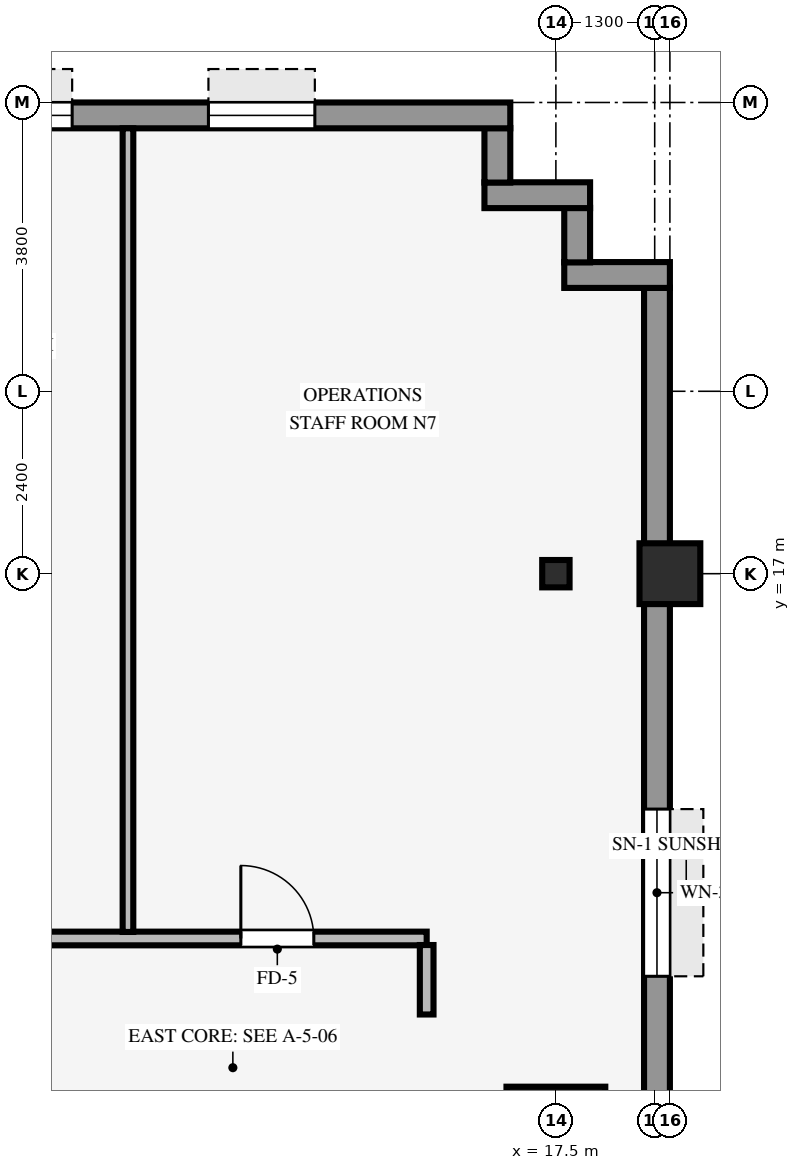
"""IFC4 building model, lengths in metres.
Left out: names, types, materials, properties, quantities, classifications, styles, units other than length and angle.
Written with IfcOpenShell. Run it as: python <this file> out.ifc"""

import sys

from ifc_helpers import new_model, si_unit, direction, frame, frame_2d, origin, origin_2d, place, context, subcontext, project, spatial, rectangle, hollow_rectangle, i_section, extrude, source, transform, mapped, element, fill, save


model = new_model("IFC4")
c1 = context("Model", 3, precision=1e-05, world=origin(), true_north=direction((0.0, 1.0)))
c2 = subcontext(c1, "Body", "Model", "MODEL_VIEW")
j1 = project(units=[si_unit("LENGTHUNIT", "METRE"), si_unit("PLANEANGLEUNIT", "RADIAN")], contexts=[c1])
p1 = place(None, origin())
s1 = spatial("IfcSite", under=j1, at=p1, CompositionType="ELEMENT")
p2 = place(p1, origin())
s2 = spatial("IfcBuilding", under=s1, at=p2, CompositionType="ELEMENT")
p3 = place(p2, frame((0.0, 0.0, 53.15)))
s3 = spatial("IfcBuildingStorey", under=s2, at=p3, CompositionType="ELEMENT", Elevation=53.15)
p4 = place(p3, frame((17.5, 9.6, 0.0), z_axis=(0.0, 0.0, 1.0), x_axis=(1.0, 0.0, 0.0)))
e1 = element("IfcColumn", 1, at=p4, inside=s3, PredefinedType="COLUMN", context=c2, shape_type="SweptSolid", body=[
    extrude(rectangle(XDim=1.3, YDim=1.3, at=origin_2d()), origin(), (0.0, 0.0, 1.0), 3.25),
])
p5 = place(p3, frame((19.0, 17.0, 0.0), z_axis=(0.0, 0.0, 1.0), x_axis=(1.0, 0.0, 0.0)))
e2 = element("IfcColumn", 2, at=p5, inside=s3, PredefinedType="COLUMN", context=c2, shape_type="SweptSolid", body=[
    extrude(hollow_rectangle(XDim=0.8, YDim=0.8, WallThickness=0.055, InnerFilletRadius=0.055, OuterFilletRadius=0.11, at=origin_2d()), origin(), (0.0, 0.0, 1.0), 3.25),
])
p6 = place(p3, frame((17.5, 17.0, 0.0), z_axis=(0.0, 0.0, 1.0), x_axis=(1.0, 0.0, 0.0)))
e3 = element("IfcColumn", 3, at=p6, inside=s3, PredefinedType="COLUMN", context=c2, shape_type="SweptSolid", body=[
    extrude(i_section(OverallWidth=0.36, OverallDepth=0.36, WebThickness=0.021, FlangeThickness=0.021, FilletRadius=0.018, at=origin_2d()), origin(), (0.0, 0.0, 1.0), 3.25),
])
p7 = place(p3, frame((18.83, -20.764, 0.0), z_axis=(0.0, 0.0, 1.0), x_axis=(0.0, 1.0, 0.0)))
e4 = element("IfcWall", 4, at=p7, inside=s3, PredefinedType="STANDARD", context=c2, shape_type="SweptSolid", body=[
    extrude(rectangle(XDim=41.528, YDim=0.34, at=frame_2d((20.764, 0.0))), origin(), (0.0, 0.0, 1.0), 3.24),
])
p8 = place(p7, frame((6.862, 0.0, 0.8)))
e5 = element("IfcOpeningElement", 5, at=p8, cuts=e4, PredefinedType="OPENING", context=c2, shape_type="SweptSolid", body=[
    extrude(rectangle(XDim=2.2, YDim=1.65, at=frame_2d((1.1, 0.825))), frame((0.0, 0.18, 0.0), z_axis=(0.0, -1.0, 0.0), x_axis=(1.0, 0.0, 0.0)), (0.0, 0.0, 1.0), 0.36),
])
p9 = place(p7, frame((32.467, 0.0, 0.8)))
e6 = element("IfcOpeningElement", 6, at=p9, cuts=e4, PredefinedType="OPENING", context=c2, shape_type="SweptSolid", body=[
    extrude(rectangle(XDim=2.2, YDim=1.65, at=frame_2d((1.1, 0.825))), frame((0.0, 0.18, 0.0), z_axis=(0.0, -1.0, 0.0), x_axis=(1.0, 0.0, 0.0)), (0.0, 0.0, 1.0), 0.36),
])
p10 = place(p3, frame((17.61, 20.93, 0.0), z_axis=(0.0, 0.0, 1.0), x_axis=(1.0, 0.0, 0.0)))
e7 = element("IfcWall", 7, at=p10, inside=s3, PredefinedType="STANDARD", context=c2, shape_type="SweptSolid", body=[
    extrude(rectangle(XDim=1.39, YDim=0.34, at=frame_2d((0.695, 0.0))), origin(), (0.0, 0.0, 1.0), 3.24),
])
p11 = place(p3, frame((17.78, 21.096, 0.0), z_axis=(0.0, 0.0, 1.0), x_axis=(0.0, 1.0, 0.0)))
e8 = element("IfcWall", 8, at=p11, inside=s3, PredefinedType="STANDARD", context=c2, shape_type="SweptSolid", body=[
    extrude(rectangle(XDim=0.718, YDim=0.34, at=frame_2d((0.359, 0.0))), origin(), (0.0, 0.0, 1.0), 3.24),
])
p12 = place(p3, frame((16.56, 21.98, 0.0), z_axis=(0.0, 0.0, 1.0), x_axis=(1.0, 0.0, 0.0)))
e9 = element("IfcWall", 9, at=p12, inside=s3, PredefinedType="STANDARD", context=c2, shape_type="SweptSolid", body=[
    extrude(rectangle(XDim=1.39, YDim=0.34, at=frame_2d((0.695, 0.0))), origin(), (0.0, 0.0, 1.0), 3.24),
])
p13 = place(p3, frame((16.73, 22.146, 0.0), z_axis=(0.0, 0.0, 1.0), x_axis=(0.0, 1.0, 0.0)))
e10 = element("IfcWall", 10, at=p13, inside=s3, PredefinedType="STANDARD", context=c2, shape_type="SweptSolid", body=[
    extrude(rectangle(XDim=0.718, YDim=0.34, at=frame_2d((0.359, 0.0))), origin(), (0.0, 0.0, 1.0), 3.24),
])
p14 = place(p3, frame((-16.9, 23.03, 0.0), z_axis=(0.0, 0.0, 1.0), x_axis=(1.0, 0.0, 0.0)))
e11 = element("IfcWall", 11, at=p14, inside=s3, PredefinedType="STANDARD", context=c2, shape_type="SweptSolid", body=[
    extrude(rectangle(XDim=33.8, YDim=0.34, at=frame_2d((16.9, 0.0))), origin(), (0.0, 0.0, 1.0), 2.585),
])
p15 = place(p14, frame((2.121, 0.0, 0.8)))
e12 = element("IfcOpeningElement", 12, at=p15, cuts=e11, PredefinedType="OPENING", context=c2, shape_type="SweptSolid", body=[
    extrude(rectangle(XDim=1.4, YDim=1.65, at=frame_2d((0.7, 0.825))), frame((0.0, 0.18, 0.0), z_axis=(0.0, -1.0, 0.0), x_axis=(1.0, 0.0, 0.0)), (0.0, 0.0, 1.0), 0.36),
])
p16 = place(p14, frame((5.764, 0.0, 0.8)))
e13 = element("IfcOpeningElement", 13, at=p16, cuts=e11, PredefinedType="OPENING", context=c2, shape_type="SweptSolid", body=[
    extrude(rectangle(XDim=1.4, YDim=1.65, at=frame_2d((0.7, 0.825))), frame((0.0, 0.18, 0.0), z_axis=(0.0, -1.0, 0.0), x_axis=(1.0, 0.0, 0.0)), (0.0, 0.0, 1.0), 0.36),
])
p17 = place(p14, frame((11.657, 0.0, 0.8)))
e14 = element("IfcOpeningElement", 14, at=p17, cuts=e11, PredefinedType="OPENING", context=c2, shape_type="SweptSolid", body=[
    extrude(rectangle(XDim=1.4, YDim=1.65, at=frame_2d((0.7, 0.825))), frame((0.0, 0.18, 0.0), z_axis=(0.0, -1.0, 0.0), x_axis=(1.0, 0.0, 0.0)), (0.0, 0.0, 1.0), 0.36),
])
p18 = place(p14, frame((21.193, 0.0, 0.8)))
e15 = element("IfcOpeningElement", 15, at=p18, cuts=e11, PredefinedType="OPENING", context=c2, shape_type="SweptSolid", body=[
    extrude(rectangle(XDim=1.4, YDim=1.65, at=frame_2d((0.7, 0.825))), frame((0.0, 0.18, 0.0), z_axis=(0.0, -1.0, 0.0), x_axis=(1.0, 0.0, 0.0)), (0.0, 0.0, 1.0), 0.36),
])
p19 = place(p14, frame((26.636, 0.0, 0.8)))
e16 = element("IfcOpeningElement", 16, at=p19, cuts=e11, PredefinedType="OPENING", context=c2, shape_type="SweptSolid", body=[
    extrude(rectangle(XDim=1.4, YDim=1.65, at=frame_2d((0.7, 0.825))), frame((0.0, 0.18, 0.0), z_axis=(0.0, -1.0, 0.0), x_axis=(1.0, 0.0, 0.0)), (0.0, 0.0, 1.0), 0.36),
])
p20 = place(p14, frame((29.829, 0.0, 0.8)))
e17 = element("IfcOpeningElement", 17, at=p20, cuts=e11, PredefinedType="OPENING", context=c2, shape_type="SweptSolid", body=[
    extrude(rectangle(XDim=1.4, YDim=1.65, at=frame_2d((0.7, 0.825))), frame((0.0, 0.18, 0.0), z_axis=(0.0, -1.0, 0.0), x_axis=(1.0, 0.0, 0.0)), (0.0, 0.0, 1.0), 0.36),
])
p21 = place(p3, frame((-15.8, 12.2, 0.0), z_axis=(0.0, 0.0, 1.0), x_axis=(1.0, 0.0, 0.0)))
e18 = element("IfcWall", 18, at=p21, inside=s3, PredefinedType="PARTITIONING", context=c2, shape_type="SweptSolid", body=[
    extrude(rectangle(XDim=31.6, YDim=0.18, at=frame_2d((15.8, 0.0))), origin(), (0.0, 0.0, 1.0), 3.24),
])
p22 = place(p21, frame((5.605, 0.0, 0.0)))
e19 = element("IfcOpeningElement", 19, at=p22, cuts=e18, PredefinedType="OPENING", context=c2, shape_type="SweptSolid", body=[
    extrude(rectangle(XDim=0.96, YDim=2.1, at=frame_2d((0.48, 1.05))), frame((0.0, 0.1, 0.0), z_axis=(0.0, -1.0, 0.0), x_axis=(1.0, 0.0, 0.0)), (0.0, 0.0, 1.0), 0.2),
])
p23 = place(p21, frame((16.895, 0.0, 0.0)))
e20 = element("IfcOpeningElement", 20, at=p23, cuts=e18, PredefinedType="OPENING", context=c2, shape_type="SweptSolid", body=[
    extrude(rectangle(XDim=0.96, YDim=2.1, at=frame_2d((0.48, 1.05))), frame((0.0, 0.1, 0.0), z_axis=(0.0, -1.0, 0.0), x_axis=(1.0, 0.0, 0.0)), (0.0, 0.0, 1.0), 0.2),
])
p24 = place(p21, frame((21.25, 0.0, 0.0)))
e21 = element("IfcOpeningElement", 21, at=p24, cuts=e18, PredefinedType="OPENING", context=c2, shape_type="SweptSolid", body=[
    extrude(rectangle(XDim=0.96, YDim=2.1, at=frame_2d((0.48, 1.05))), frame((0.0, 0.1, 0.0), z_axis=(0.0, -1.0, 0.0), x_axis=(1.0, 0.0, 0.0)), (0.0, 0.0, 1.0), 0.2),
])
p25 = place(p21, frame((25.21, 0.0, 0.0)))
e22 = element("IfcOpeningElement", 22, at=p25, cuts=e18, PredefinedType="OPENING", context=c2, shape_type="SweptSolid", body=[
    extrude(rectangle(XDim=0.96, YDim=2.1, at=frame_2d((0.48, 1.05))), frame((0.0, 0.1, 0.0), z_axis=(0.0, -1.0, 0.0), x_axis=(1.0, 0.0, 0.0)), (0.0, 0.0, 1.0), 0.2),
])
p26 = place(p21, frame((29.155, 0.0, 0.0)))
e23 = element("IfcOpeningElement", 23, at=p26, cuts=e18, PredefinedType="OPENING", context=c2, shape_type="SweptSolid", body=[
    extrude(rectangle(XDim=0.96, YDim=2.1, at=frame_2d((0.48, 1.05))), frame((0.0, 0.1, 0.0), z_axis=(0.0, -1.0, 0.0), x_axis=(1.0, 0.0, 0.0)), (0.0, 0.0, 1.0), 0.2),
])
p27 = place(p21, frame((10.5, 0.0, 0.0)))
e24 = element("IfcOpeningElement", 24, at=p27, cuts=e18, PredefinedType="OPENING", context=c2, shape_type="SweptSolid", body=[
    extrude(rectangle(XDim=0.96, YDim=2.1, at=frame_2d((0.48, 1.05))), frame((0.0, 0.1, 0.0), z_axis=(0.0, -1.0, 0.0), x_axis=(1.0, 0.0, 0.0)), (0.0, 0.0, 1.0), 0.2),
])
p28 = place(p21, frame((0.925, 0.0, 0.0)))
e25 = element("IfcOpeningElement", 25, at=p28, cuts=e18, PredefinedType="OPENING", context=c2, shape_type="SweptSolid", body=[
    extrude(rectangle(XDim=0.96, YDim=2.1, at=frame_2d((0.48, 1.05))), frame((0.0, 0.1, 0.0), z_axis=(0.0, -1.0, 0.0), x_axis=(1.0, 0.0, 0.0)), (0.0, 0.0, 1.0), 0.2),
])
p29 = place(p3, frame((11.87, 12.286, 0.0), z_axis=(0.0, 0.0, 1.0), x_axis=(0.0, 1.0, 0.0)))
e26 = element("IfcWall", 26, at=p29, inside=s3, PredefinedType="PARTITIONING", context=c2, shape_type="SweptSolid", body=[
    extrude(rectangle(XDim=10.574, YDim=0.14, at=frame_2d((5.287, 0.0))), origin(), (0.0, 0.0, 1.0), 3.24),
])
p30 = place(p3, frame((15.8, 11.2, 0.0), z_axis=(0.0, 0.0, 1.0), x_axis=(0.0, 1.0, 0.0)))
e27 = element("IfcWall", 27, at=p30, inside=s3, PredefinedType="PARTITIONING", context=c2, shape_type="SweptSolid", body=[
    extrude(rectangle(XDim=0.914, YDim=0.18, at=frame_2d((0.457, 0.0))), origin(), (0.0, 0.0, 1.0), 3.24),
])
m1 = source(origin(), c2, "Body", "SweptSolid", [
    extrude(rectangle(XDim=2.2, YDim=1.65, at=frame_2d((1.1, 0.825))), frame((0.0, 0.03, 0.0), z_axis=(0.0, -1.0, 0.0), x_axis=(1.0, 0.0, 0.0)), (0.0, 0.0, 1.0), 0.06),
])
p31 = place(p9, origin())
e28 = element("IfcWindow", 28, at=p31, inside=s3, PartitioningType="SINGLE_PANEL", PredefinedType="WINDOW", context=c2, shape_type="MappedRepresentation", body=[
    mapped(m1, transform((0.0, 0.0, 0.0), scale=1.0)),
])
fill(e6, e28)
m2 = source(origin(), c2, "Body", "SweptSolid", [
    extrude(rectangle(XDim=1.4, YDim=1.65, at=frame_2d((0.7, 0.825))), frame((0.0, 0.03, 0.0), z_axis=(0.0, -1.0, 0.0), x_axis=(1.0, 0.0, 0.0)), (0.0, 0.0, 1.0), 0.06),
])
p32 = place(p19, origin())
e29 = element("IfcWindow", 29, at=p32, inside=s3, PartitioningType="SINGLE_PANEL", PredefinedType="WINDOW", context=c2, shape_type="MappedRepresentation", body=[
    mapped(m2, transform((0.0, 0.0, 0.0), scale=1.0)),
])
fill(e16, e29)
p33 = place(p20, origin())
e30 = element("IfcWindow", 30, at=p33, inside=s3, PartitioningType="SINGLE_PANEL", PredefinedType="WINDOW", context=c2, shape_type="MappedRepresentation", body=[
    mapped(m2, transform((0.0, 0.0, 0.0), scale=1.0)),
])
fill(e17, e30)
m3 = source(origin(), c2, "Body", "SweptSolid", [
    extrude(rectangle(XDim=0.96, YDim=2.1, at=frame_2d((0.48, 1.05))), frame((0.0, 0.025, 0.0), z_axis=(0.0, -1.0, 0.0), x_axis=(1.0, 0.0, 0.0)), (0.0, 0.0, 1.0), 0.05),
])
p34 = place(p26, origin())
e31 = element("IfcDoor", 31, at=p34, inside=s3, OperationType="SINGLE_SWING_LEFT", PredefinedType="DOOR", context=c2, shape_type="MappedRepresentation", body=[
    mapped(m3, transform((0.0, 0.0, 0.0), scale=1.0)),
])
fill(e23, e31)
save(model, sys.argv[1])
